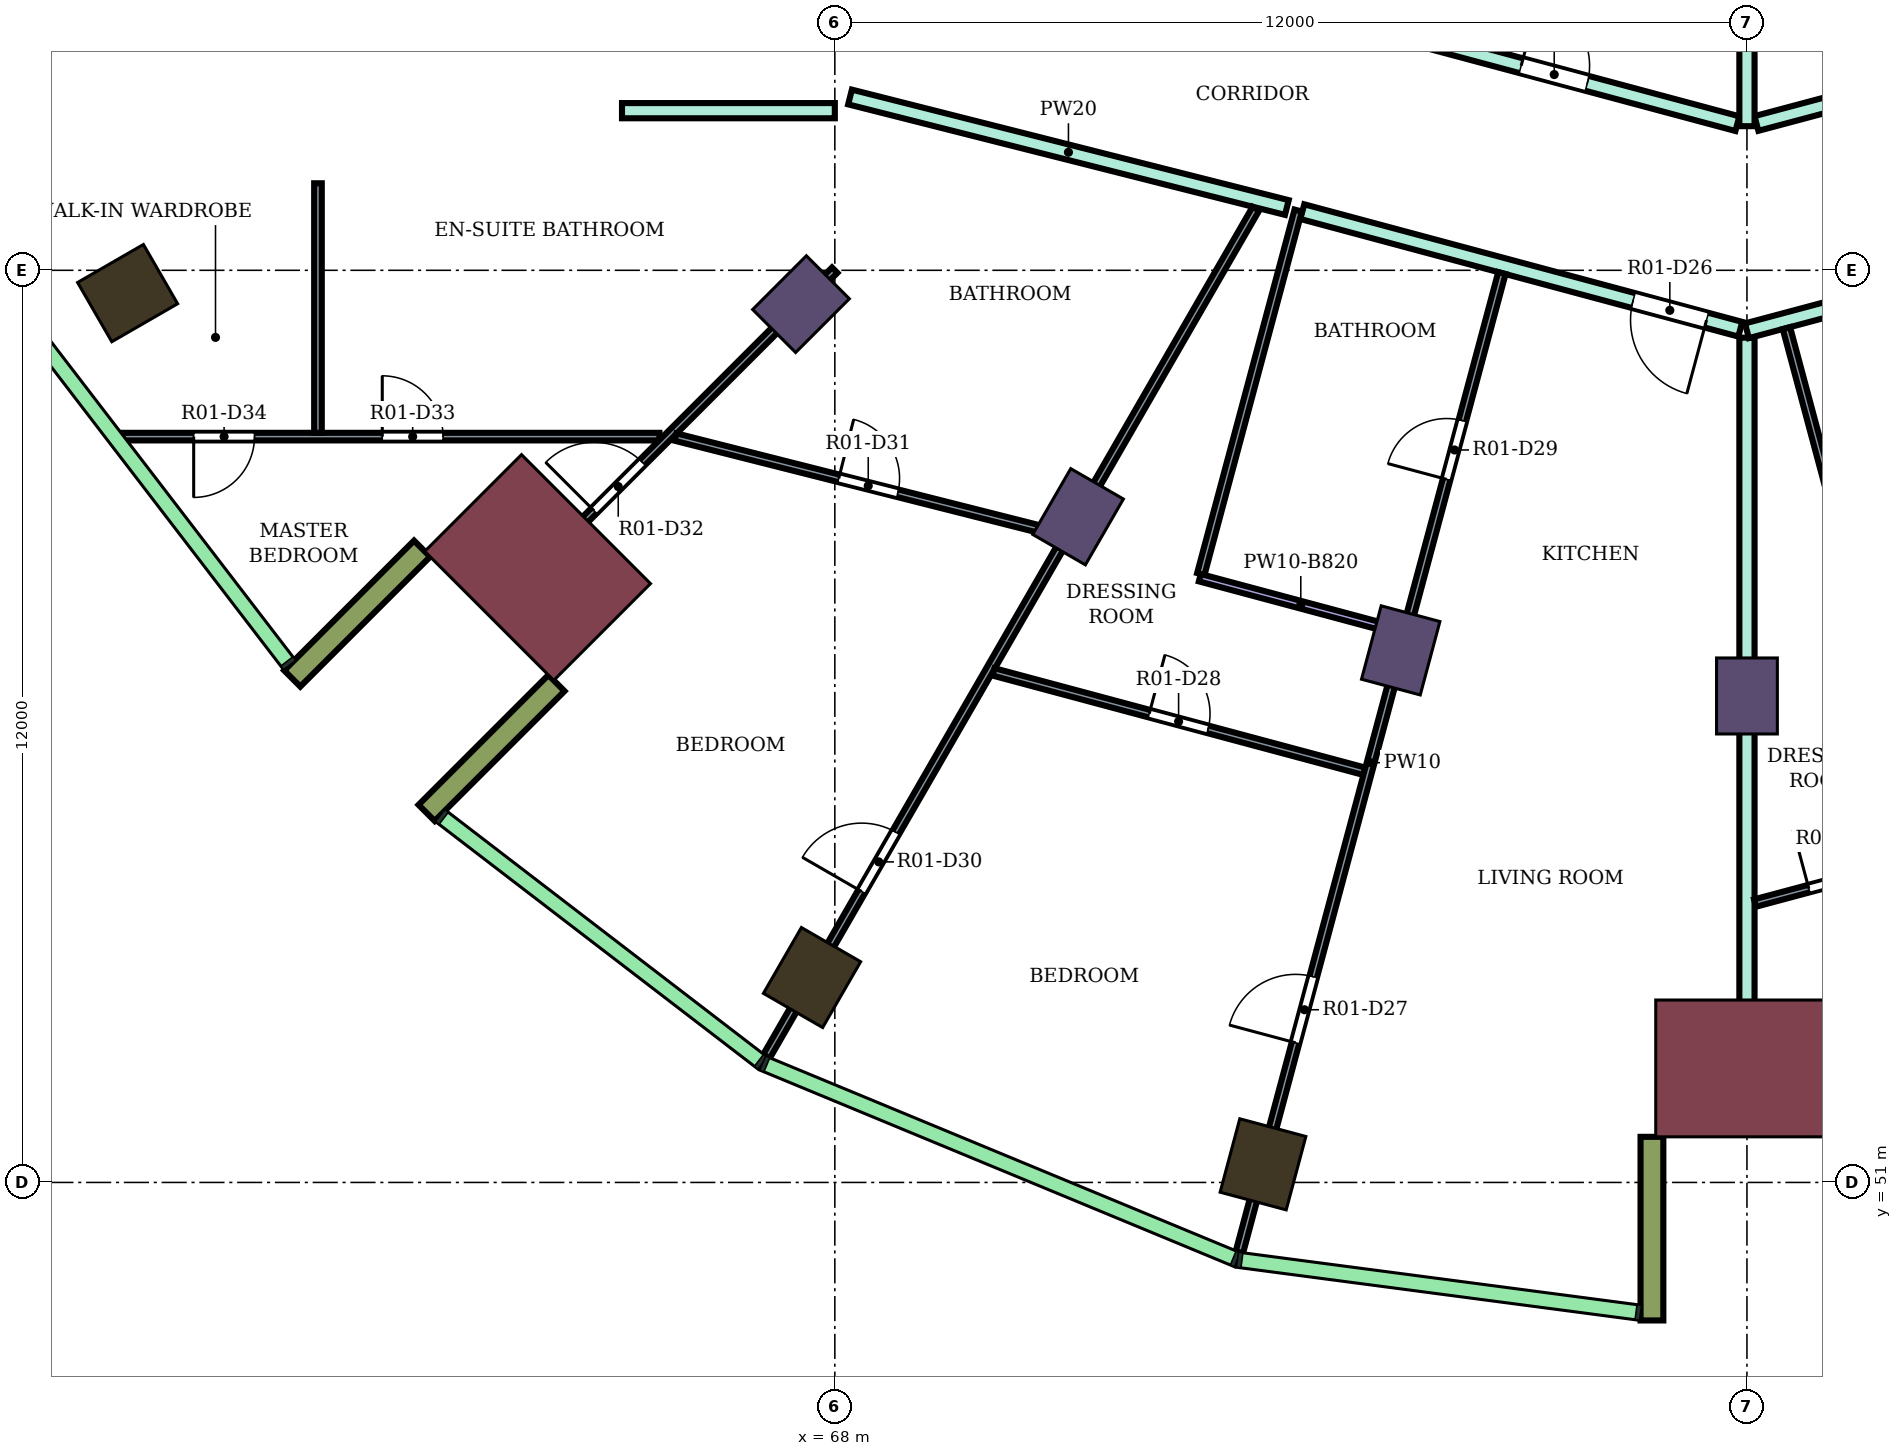
"""IFC4 building model, lengths in metres.
Left out: names, types, materials, properties, quantities, classifications, styles, units other than length and angle.
Written with IfcOpenShell. Run it as: python <this file> out.ifc"""

import sys

from ifc_helpers import new_model, si_unit, direction, frame, frame_2d, origin, origin_2d, place, context, subcontext, project, spatial, rectangle, extrude, element, fill, save


model = new_model("IFC4")
c1 = context("Model", 3, precision=1e-05, world=origin(), true_north=direction((0.0, 1.0)))
c2 = subcontext(c1, "Body", "Model", "MODEL_VIEW")
j1 = project(units=[si_unit("LENGTHUNIT", "METRE"), si_unit("PLANEANGLEUNIT", "RADIAN")], contexts=[c1])
p1 = place(None, origin())
s1 = spatial("IfcSite", under=j1, at=p1, CompositionType="ELEMENT")
p2 = place(p1, origin())
s2 = spatial("IfcBuilding", under=s1, at=p2, CompositionType="ELEMENT")
p3 = place(p2, frame((0.0, 0.0, 165.9)))
s3 = spatial("IfcBuildingStorey", under=s2, at=p3, CompositionType="ELEMENT", Elevation=165.9)
for number, where, z_axis, x_axis in (
    (1, (58.696, 62.7, 0.0), (0.0, 0.0, 1.0), (-0.866, -0.5, 0.0)),
    (2, (67.7, 53.696, 0.0), (0.0, 0.0, 1.0), (-0.5, -0.866, 0.0)),
    (3, (73.633, 51.238, 0.0), (0.0, 0.0, 1.0), (-0.259, -0.966, 0.0)),
):
    element("IfcColumn", number, at=place(p3, frame(where, z_axis=z_axis, x_axis=x_axis)), inside=s3, PredefinedType="COLUMN", context=c2, shape_type="SweptSolid", body=[
        extrude(rectangle(XDim=1.0, YDim=0.9, at=origin_2d()), origin(), (0.0, 0.0, 1.0), 4.1),
    ])
for number, where, z_axis, x_axis in (
    (4, (67.555, 62.555, 0.0), (0.0, 0.0, 1.0), (-0.707, -0.707, 0.0)),
    (5, (71.2, 59.758, 0.0), (0.0, 0.0, 1.0), (-0.5, -0.866, 0.0)),
    (6, (75.445, 58.0, 0.0), (0.0, 0.0, 1.0), (-0.259, -0.966, 0.0)),
    (7, (80.0, 57.4, 0.0), (0.0, 0.0, 1.0), (0.0, -1.0, 0.0)),
):
    element("IfcColumn", number, at=place(p3, frame(where, z_axis=z_axis, x_axis=x_axis)), inside=s3, PredefinedType="COLUMN", context=c2, shape_type="SweptSolid", body=[
        extrude(rectangle(XDim=1.0, YDim=0.8, at=origin_2d()), origin(), (0.0, 0.0, 1.0), 4.1),
    ])
for number, where, z_axis, x_axis in (
    (8, (64.09, 59.09, 0.0), (0.0, 0.0, 1.0), (-0.707, -0.707, 0.0)),
    (9, (80.0, 52.5, 0.0), (0.0, 0.0, 1.0), (0.0, -1.0, 0.0)),
):
    element("IfcColumn", number, at=place(p3, frame(where, z_axis=z_axis, x_axis=x_axis)), inside=s3, PredefinedType="COLUMN", context=c2, shape_type="SweptSolid", body=[
        extrude(rectangle(XDim=1.8, YDim=2.4, at=origin_2d()), origin(), (0.0, 0.0, 1.0), 4.1),
    ])
for number, where, z_axis, x_axis in (
    (10, (62.57, 59.338, 0.0), (0.0, 0.0, 1.0), (-0.707, -0.707, 0.0)),
    (11, (64.338, 57.57, 0.0), (0.0, 0.0, 1.0), (-0.707, -0.707, 0.0)),
    (12, (78.75, 51.6, 0.0), (0.0, 0.0, 1.0), (0.0, -1.0, 0.0)),
):
    element("IfcWall", number, at=place(p3, frame(where, z_axis=z_axis, x_axis=x_axis)), inside=s3, PredefinedType="NOTDEFINED", context=c2, shape_type="SweptSolid", body=[
        extrude(rectangle(XDim=2.416, YDim=0.3, at=frame_2d((1.208, 0.0))), origin(), (0.0, 0.0, 1.0), 4.1),
    ])
p4 = place(p3, frame((65.2, 65.1, 0.0), z_axis=(0.0, 0.0, 1.0), x_axis=(1.0, 0.0, 0.0)))
e13 = element("IfcWall", 13, at=p4, inside=s3, PredefinedType="PARTITIONING", context=c2, shape_type="SweptSolid", body=[
    extrude(rectangle(XDim=2.8, YDim=0.2, at=frame_2d((1.4, 0.0))), origin(), (0.0, 0.0, 1.0), 3.65),
])
p5 = place(p3, frame((68.2, 65.28, 0.0), z_axis=(0.0, 0.0, 1.0), x_axis=(0.969450596516, -0.245286650503, 0.0)))
e14 = element("IfcWall", 14, at=p5, inside=s3, PredefinedType="PARTITIONING", context=c2, shape_type="SweptSolid", body=[
    extrude(rectangle(XDim=5.928, YDim=0.2, at=frame_2d((2.964, 0.0))), origin(), (0.0, 0.0, 1.0), 3.65),
])
p6 = place(p3, frame((74.15, 63.772, 0.0), z_axis=(0.0, 0.0, 1.0), x_axis=(0.965807109237, -0.259261697417, 0.0)))
e15 = element("IfcWall", 15, at=p6, inside=s3, PredefinedType="PARTITIONING", context=c2, shape_type="SweptSolid", body=[
    extrude(rectangle(XDim=5.967, YDim=0.2, at=frame_2d((2.983, 0.0))), origin(), (0.0, 0.0, 1.0), 3.65),
])
p7 = place(p6, frame((4.507, 0.0, 0.0)))
e16 = element("IfcOpeningElement", 16, at=p7, cuts=e15, PredefinedType="OPENING", context=c2, shape_type="SweptSolid", body=[
    extrude(rectangle(XDim=1.0, YDim=2.1, at=frame_2d((0.5, 1.05))), frame((0.0, 0.11, 0.0), z_axis=(0.0, -1.0, 0.0), x_axis=(1.0, 0.0, 0.0)), (0.0, 0.0, 1.0), 0.22),
])
p8 = place(p3, frame((74.603, 66.342, 0.0), z_axis=(0.0, 0.0, 1.0), x_axis=(0.965920893652, -0.258837453254, 0.0)))
e17 = element("IfcWall", 17, at=p8, inside=s3, PredefinedType="PARTITIONING", context=c2, shape_type="SweptSolid", body=[
    extrude(rectangle(XDim=5.458, YDim=0.2, at=frame_2d((2.729, 0.0))), origin(), (0.0, 0.0, 1.0), 3.65),
])
p9 = place(p8, frame((2.512, 0.0, 0.0)))
e18 = element("IfcOpeningElement", 18, at=p9, cuts=e17, PredefinedType="OPENING", context=c2, shape_type="SweptSolid", body=[
    extrude(rectangle(XDim=0.9, YDim=2.1, at=frame_2d((0.45, 1.05))), frame((0.0, 0.11, 0.0), z_axis=(0.0, -1.0, 0.0), x_axis=(1.0, 0.0, 0.0)), (0.0, 0.0, 1.0), 0.22),
])
p10 = place(p3, frame((80.125, 64.932, 0.0), z_axis=(0.0, 0.0, 1.0), x_axis=(0.966236955806, 0.257655089674, 0.0)))
e19 = element("IfcWall", 19, at=p10, inside=s3, PredefinedType="PARTITIONING", context=c2, shape_type="SweptSolid", body=[
    extrude(rectangle(XDim=8.039, YDim=0.2, at=frame_2d((4.02, 0.0))), origin(), (0.0, 0.0, 1.0), 3.65),
])
p11 = place(p10, frame((6.298, 0.0, 0.0)))
e20 = element("IfcOpeningElement", 20, at=p11, cuts=e19, PredefinedType="OPENING", context=c2, shape_type="SweptSolid", body=[
    extrude(rectangle(XDim=0.9, YDim=2.1, at=frame_2d((0.45, 1.05))), frame((0.0, 0.11, 0.0), z_axis=(0.0, -1.0, 0.0), x_axis=(1.0, 0.0, 0.0)), (0.0, 0.0, 1.0), 0.22),
])
p12 = place(p10, frame((2.045, 0.0, 0.0)))
e21 = element("IfcOpeningElement", 21, at=p12, cuts=e19, PredefinedType="OPENING", context=c2, shape_type="SweptSolid", body=[
    extrude(rectangle(XDim=0.9, YDim=2.1, at=frame_2d((0.45, 1.05))), frame((0.0, 0.11, 0.0), z_axis=(0.0, -1.0, 0.0), x_axis=(1.0, 0.0, 0.0)), (0.0, 0.0, 1.0), 0.22),
])
p13 = place(p3, frame((80.0, 51.8, 0.0), z_axis=(0.0, 0.0, 1.0), x_axis=(0.0, 1.0, 0.0)))
e22 = element("IfcWall", 22, at=p13, inside=s3, PredefinedType="PARTITIONING", context=c2, shape_type="SweptSolid", body=[
    extrude(rectangle(XDim=10.314, YDim=0.2, at=frame_2d((5.157, 0.0))), origin(), (0.0, 0.0, 1.0), 3.65),
])
p14 = place(p3, frame((80.0, 62.205, 0.0), z_axis=(0.0, 0.0, 1.0), x_axis=(0.966104192593, 0.258152453124, 0.0)))
e23 = element("IfcWall", 23, at=p14, inside=s3, PredefinedType="PARTITIONING", context=c2, shape_type="SweptSolid", body=[
    extrude(rectangle(XDim=6.266, YDim=0.2, at=frame_2d((3.133, 0.0))), origin(), (0.0, 0.0, 1.0), 3.65),
])
p15 = place(p14, frame((3.842, 0.0, 0.0)))
e24 = element("IfcOpeningElement", 24, at=p15, cuts=e23, PredefinedType="OPENING", context=c2, shape_type="SweptSolid", body=[
    extrude(rectangle(XDim=1.0, YDim=2.1, at=frame_2d((0.5, 1.05))), frame((0.0, 0.11, 0.0), z_axis=(0.0, -1.0, 0.0), x_axis=(1.0, 0.0, 0.0)), (0.0, 0.0, 1.0), 0.22),
])
p16 = place(p3, frame((80.0, 64.896, 0.0), z_axis=(0.0, 0.0, 1.0), x_axis=(0.0, 1.0, 0.0)))
e25 = element("IfcWall", 25, at=p16, inside=s3, PredefinedType="PARTITIONING", context=c2, shape_type="SweptSolid", body=[
    extrude(rectangle(XDim=2.405, YDim=0.2, at=frame_2d((1.203, 0.0))), origin(), (0.0, 0.0, 1.0), 3.65),
])
p17 = place(p3, frame((58.6, 60.812, 0.0), z_axis=(0.0, 0.0, 1.0), x_axis=(1.0, 0.0, 0.0)))
e26 = element("IfcWall", 26, at=p17, inside=s3, PredefinedType="PARTITIONING", context=c2, shape_type="SweptSolid", body=[
    extrude(rectangle(XDim=7.092, YDim=0.1, at=frame_2d((3.546, 0.0))), origin(), (0.0, 0.0, 1.0), 3.65),
])
p18 = place(p17, frame((3.446, 0.0, 0.0)))
e27 = element("IfcOpeningElement", 27, at=p18, cuts=e26, PredefinedType="OPENING", context=c2, shape_type="SweptSolid", body=[
    extrude(rectangle(XDim=0.8, YDim=2.1, at=frame_2d((0.4, 1.05))), frame((0.0, 0.06, 0.0), z_axis=(0.0, -1.0, 0.0), x_axis=(1.0, 0.0, 0.0)), (0.0, 0.0, 1.0), 0.12),
])
p19 = place(p17, frame((0.965, 0.0, 0.0)))
e28 = element("IfcOpeningElement", 28, at=p19, cuts=e26, PredefinedType="OPENING", context=c2, shape_type="SweptSolid", body=[
    extrude(rectangle(XDim=0.8, YDim=2.1, at=frame_2d((0.4, 1.05))), frame((0.0, 0.06, 0.0), z_axis=(0.0, -1.0, 0.0), x_axis=(1.0, 0.0, 0.0)), (0.0, 0.0, 1.0), 0.12),
])
p20 = place(p3, frame((61.2, 60.862, 0.0), z_axis=(0.0, 0.0, 1.0), x_axis=(0.0, 1.0, 0.0)))
e29 = element("IfcWall", 29, at=p20, inside=s3, PredefinedType="PARTITIONING", context=c2, shape_type="SweptSolid", body=[
    extrude(rectangle(XDim=3.283, YDim=0.1, at=frame_2d((1.642, 0.0))), origin(), (0.0, 0.0, 1.0), 3.65),
])
p21 = place(p3, frame((63.593, 58.598, 0.0), z_axis=(0.0, 0.0, 1.0), x_axis=(0.707243952197, 0.706969583561, 0.0)))
e30 = element("IfcWall", 30, at=p21, inside=s3, PredefinedType="PARTITIONING", context=c2, shape_type="SweptSolid", body=[
    extrude(rectangle(XDim=6.229, YDim=0.1, at=frame_2d((3.114, 0.0))), origin(), (0.0, 0.0, 1.0), 3.65),
])
p22 = place(p21, frame((1.752, 0.0, 0.0)))
e31 = element("IfcOpeningElement", 31, at=p22, cuts=e30, PredefinedType="OPENING", context=c2, shape_type="SweptSolid", body=[
    extrude(rectangle(XDim=0.9, YDim=2.1, at=frame_2d((0.45, 1.05))), frame((0.0, 0.06, 0.0), z_axis=(0.0, -1.0, 0.0), x_axis=(1.0, 0.0, 0.0)), (0.0, 0.0, 1.0), 0.12),
])
p23 = place(p3, frame((65.904, 60.806, 0.0), z_axis=(0.0, 0.0, 1.0), x_axis=(0.969477107154, -0.245181848237, 0.0)))
e32 = element("IfcWall", 32, at=p23, inside=s3, PredefinedType="PARTITIONING", context=c2, shape_type="SweptSolid", body=[
    extrude(rectangle(XDim=5.252, YDim=0.1, at=frame_2d((2.626, 0.0))), origin(), (0.0, 0.0, 1.0), 3.65),
])
p24 = place(p23, frame((2.216, 0.0, 0.0)))
e33 = element("IfcOpeningElement", 33, at=p24, cuts=e32, PredefinedType="OPENING", context=c2, shape_type="SweptSolid", body=[
    extrude(rectangle(XDim=0.8, YDim=2.1, at=frame_2d((0.4, 1.05))), frame((0.0, 0.06, 0.0), z_axis=(0.0, -1.0, 0.0), x_axis=(1.0, 0.0, 0.0)), (0.0, 0.0, 1.0), 0.12),
])
p25 = place(p3, frame((67.101, 52.659, 0.0), z_axis=(0.0, 0.0, 1.0), x_axis=(0.499985055897, 0.866034031594, 0.0)))
e34 = element("IfcWall", 34, at=p25, inside=s3, PredefinedType="PARTITIONING", context=c2, shape_type="SweptSolid", body=[
    extrude(rectangle(XDim=12.876, YDim=0.1, at=frame_2d((6.438, 0.0))), origin(), (0.0, 0.0, 1.0), 3.65),
])
p26 = place(p25, frame((2.504, 0.0, 0.0)))
e35 = element("IfcOpeningElement", 35, at=p26, cuts=e34, PredefinedType="OPENING", context=c2, shape_type="SweptSolid", body=[
    extrude(rectangle(XDim=0.9, YDim=2.1, at=frame_2d((0.45, 1.05))), frame((0.0, 0.06, 0.0), z_axis=(0.0, -1.0, 0.0), x_axis=(1.0, 0.0, 0.0)), (0.0, 0.0, 1.0), 0.12),
])
p27 = place(p3, frame((70.088, 57.717, 0.0), z_axis=(0.0, 0.0, 1.0), x_axis=(0.965906836082, -0.258889907124, 0.0)))
e36 = element("IfcWall", 36, at=p27, inside=s3, PredefinedType="PARTITIONING", context=c2, shape_type="SweptSolid", body=[
    extrude(rectangle(XDim=5.051, YDim=0.1, at=frame_2d((2.525, 0.0))), origin(), (0.0, 0.0, 1.0), 3.65),
])
p28 = place(p27, frame((2.121, 0.0, 0.0)))
e37 = element("IfcOpeningElement", 37, at=p28, cuts=e36, PredefinedType="OPENING", context=c2, shape_type="SweptSolid", body=[
    extrude(rectangle(XDim=0.8, YDim=2.1, at=frame_2d((0.4, 1.05))), frame((0.0, 0.06, 0.0), z_axis=(0.0, -1.0, 0.0), x_axis=(1.0, 0.0, 0.0)), (0.0, 0.0, 1.0), 0.12),
])
p29 = place(p3, frame((72.815, 59.004, 0.0), z_axis=(0.0, 0.0, 1.0), x_axis=(0.25878292514, 0.96593550388, 0.0)))
e38 = element("IfcWall", 38, at=p29, inside=s3, PredefinedType="PARTITIONING", context=c2, shape_type="SweptSolid", body=[
    extrude(rectangle(XDim=4.95, YDim=0.1, at=frame_2d((2.475, 0.0))), origin(), (0.0, 0.0, 1.0), 3.65),
])
p30 = place(p3, frame((72.802, 58.956, 0.0), z_axis=(0.0, 0.0, 1.0), x_axis=(0.965887802097, -0.258960911647, 0.0)))
e39 = element("IfcWall", 39, at=p30, inside=s3, PredefinedType="PARTITIONING", context=c2, shape_type="SweptSolid", body=[
    extrude(rectangle(XDim=2.75, YDim=0.1, at=frame_2d((1.375, 0.0))), origin(), (0.0, 0.0, 1.0), 3.28),
])
p31 = place(p3, frame((73.322, 50.081, 0.0), z_axis=(0.0, 0.0, 1.0), x_axis=(0.258982801816, 0.965881932931, 0.0)))
e40 = element("IfcWall", 40, at=p31, inside=s3, PredefinedType="PARTITIONING", context=c2, shape_type="SweptSolid", body=[
    extrude(rectangle(XDim=13.338, YDim=0.1, at=frame_2d((6.669, 0.0))), origin(), (0.0, 0.0, 1.0), 3.65),
])
p32 = place(p31, frame((2.854, 0.0, 0.0)))
e41 = element("IfcOpeningElement", 41, at=p32, cuts=e40, PredefinedType="OPENING", context=c2, shape_type="SweptSolid", body=[
    extrude(rectangle(XDim=0.9, YDim=2.1, at=frame_2d((0.45, 1.05))), frame((0.0, 0.06, 0.0), z_axis=(0.0, -1.0, 0.0), x_axis=(1.0, 0.0, 0.0)), (0.0, 0.0, 1.0), 0.12),
])
p33 = place(p31, frame((10.528, 0.0, 0.0)))
e42 = element("IfcOpeningElement", 42, at=p33, cuts=e40, PredefinedType="OPENING", context=c2, shape_type="SweptSolid", body=[
    extrude(rectangle(XDim=0.8, YDim=2.1, at=frame_2d((0.4, 1.05))), frame((0.0, 0.06, 0.0), z_axis=(0.0, -1.0, 0.0), x_axis=(1.0, 0.0, 0.0)), (0.0, 0.0, 1.0), 0.12),
])
p34 = place(p3, frame((80.106, 54.676, 0.0), z_axis=(0.0, 0.0, 1.0), x_axis=(0.965976901679, 0.258628353863, 0.0)))
e43 = element("IfcWall", 43, at=p34, inside=s3, PredefinedType="PARTITIONING", context=c2, shape_type="SweptSolid", body=[
    extrude(rectangle(XDim=5.097, YDim=0.1, at=frame_2d((2.549, 0.0))), origin(), (0.0, 0.0, 1.0), 3.65),
])
p35 = place(p34, frame((0.733, 0.0, 0.0)))
e44 = element("IfcOpeningElement", 44, at=p35, cuts=e43, PredefinedType="OPENING", context=c2, shape_type="SweptSolid", body=[
    extrude(rectangle(XDim=0.8, YDim=2.1, at=frame_2d((0.4, 1.05))), frame((0.0, 0.06, 0.0), z_axis=(0.0, -1.0, 0.0), x_axis=(1.0, 0.0, 0.0)), (0.0, 0.0, 1.0), 0.12),
])
p36 = place(p3, frame((80.519, 62.239, 0.0), z_axis=(0.0, 0.0, 1.0), x_axis=(0.25878046533, -0.965936162882, 0.0)))
e45 = element("IfcWall", 45, at=p36, inside=s3, PredefinedType="PARTITIONING", context=c2, shape_type="SweptSolid", body=[
    extrude(rectangle(XDim=7.149, YDim=0.1, at=frame_2d((3.575, 0.0))), origin(), (0.0, 0.0, 1.0), 3.65),
])
p37 = place(p35, origin())
e46 = element("IfcDoor", 46, at=p37, inside=s3, OperationType="SINGLE_SWING_LEFT", PredefinedType="DOOR", context=c2, shape_type="SweptSolid", body=[
    extrude(rectangle(XDim=0.8, YDim=2.1, at=frame_2d((0.4, 1.05))), frame((0.0, 0.025, 0.0), z_axis=(0.0, -1.0, 0.0), x_axis=(1.0, 0.0, 0.0)), (0.0, 0.0, 1.0), 0.05),
])
fill(e44, e46)
p38 = place(p7, frame((1.0, 0.0, 0.0), z_axis=(0.0, 0.0, 1.0), x_axis=(-1.0, 0.0, 0.0)))
e47 = element("IfcDoor", 47, at=p38, inside=s3, OperationType="SINGLE_SWING_LEFT", PredefinedType="DOOR", context=c2, shape_type="SweptSolid", body=[
    extrude(rectangle(XDim=1.0, YDim=2.1, at=frame_2d((0.5, 1.05))), frame((0.0, 0.025, 0.0), z_axis=(0.0, -1.0, 0.0), x_axis=(1.0, 0.0, 0.0)), (0.0, 0.0, 1.0), 0.05),
])
fill(e16, e47)
p39 = place(p32, origin())
e48 = element("IfcDoor", 48, at=p39, inside=s3, OperationType="SINGLE_SWING_LEFT", PredefinedType="DOOR", context=c2, shape_type="SweptSolid", body=[
    extrude(rectangle(XDim=0.9, YDim=2.1, at=frame_2d((0.45, 1.05))), frame((0.0, 0.025, 0.0), z_axis=(0.0, -1.0, 0.0), x_axis=(1.0, 0.0, 0.0)), (0.0, 0.0, 1.0), 0.05),
])
fill(e41, e48)
p40 = place(p28, origin())
e49 = element("IfcDoor", 49, at=p40, inside=s3, OperationType="SINGLE_SWING_LEFT", PredefinedType="DOOR", context=c2, shape_type="SweptSolid", body=[
    extrude(rectangle(XDim=0.8, YDim=2.1, at=frame_2d((0.4, 1.05))), frame((0.0, 0.025, 0.0), z_axis=(0.0, -1.0, 0.0), x_axis=(1.0, 0.0, 0.0)), (0.0, 0.0, 1.0), 0.05),
])
fill(e37, e49)
p41 = place(p33, origin())
e50 = element("IfcDoor", 50, at=p41, inside=s3, OperationType="SINGLE_SWING_LEFT", PredefinedType="DOOR", context=c2, shape_type="SweptSolid", body=[
    extrude(rectangle(XDim=0.8, YDim=2.1, at=frame_2d((0.4, 1.05))), frame((0.0, 0.025, 0.0), z_axis=(0.0, -1.0, 0.0), x_axis=(1.0, 0.0, 0.0)), (0.0, 0.0, 1.0), 0.05),
])
fill(e42, e50)
p42 = place(p26, origin())
e51 = element("IfcDoor", 51, at=p42, inside=s3, OperationType="SINGLE_SWING_LEFT", PredefinedType="DOOR", context=c2, shape_type="SweptSolid", body=[
    extrude(rectangle(XDim=0.9, YDim=2.1, at=frame_2d((0.45, 1.05))), frame((0.0, 0.025, 0.0), z_axis=(0.0, -1.0, 0.0), x_axis=(1.0, 0.0, 0.0)), (0.0, 0.0, 1.0), 0.05),
])
fill(e35, e51)
p43 = place(p24, origin())
e52 = element("IfcDoor", 52, at=p43, inside=s3, OperationType="SINGLE_SWING_LEFT", PredefinedType="DOOR", context=c2, shape_type="SweptSolid", body=[
    extrude(rectangle(XDim=0.8, YDim=2.1, at=frame_2d((0.4, 1.05))), frame((0.0, 0.025, 0.0), z_axis=(0.0, -1.0, 0.0), x_axis=(1.0, 0.0, 0.0)), (0.0, 0.0, 1.0), 0.05),
])
fill(e33, e52)
p44 = place(p22, origin())
e53 = element("IfcDoor", 53, at=p44, inside=s3, OperationType="SINGLE_SWING_LEFT", PredefinedType="DOOR", context=c2, shape_type="SweptSolid", body=[
    extrude(rectangle(XDim=0.9, YDim=2.1, at=frame_2d((0.45, 1.05))), frame((0.0, 0.025, 0.0), z_axis=(0.0, -1.0, 0.0), x_axis=(1.0, 0.0, 0.0)), (0.0, 0.0, 1.0), 0.05),
])
fill(e31, e53)
p45 = place(p18, origin())
e54 = element("IfcDoor", 54, at=p45, inside=s3, OperationType="SINGLE_SWING_LEFT", PredefinedType="DOOR", context=c2, shape_type="SweptSolid", body=[
    extrude(rectangle(XDim=0.8, YDim=2.1, at=frame_2d((0.4, 1.05))), frame((0.0, 0.025, 0.0), z_axis=(0.0, -1.0, 0.0), x_axis=(1.0, 0.0, 0.0)), (0.0, 0.0, 1.0), 0.05),
])
fill(e27, e54)
p46 = place(p19, frame((0.8, 0.0, 0.0), z_axis=(0.0, 0.0, 1.0), x_axis=(-1.0, 0.0, 0.0)))
e55 = element("IfcDoor", 55, at=p46, inside=s3, OperationType="SINGLE_SWING_RIGHT", PredefinedType="DOOR", context=c2, shape_type="SweptSolid", body=[
    extrude(rectangle(XDim=0.8, YDim=2.1, at=frame_2d((0.4, 1.05))), frame((0.0, 0.025, 0.0), z_axis=(0.0, -1.0, 0.0), x_axis=(1.0, 0.0, 0.0)), (0.0, 0.0, 1.0), 0.05),
])
fill(e28, e55)
p47 = place(p9, origin())
e56 = element("IfcDoor", 56, at=p47, inside=s3, OperationType="SINGLE_SWING_LEFT", PredefinedType="DOOR", context=c2, shape_type="SweptSolid", body=[
    extrude(rectangle(XDim=0.9, YDim=2.1, at=frame_2d((0.45, 1.05))), frame((0.0, 0.025, 0.0), z_axis=(0.0, -1.0, 0.0), x_axis=(1.0, 0.0, 0.0)), (0.0, 0.0, 1.0), 0.05),
])
fill(e18, e56)
save(model, sys.argv[1])
